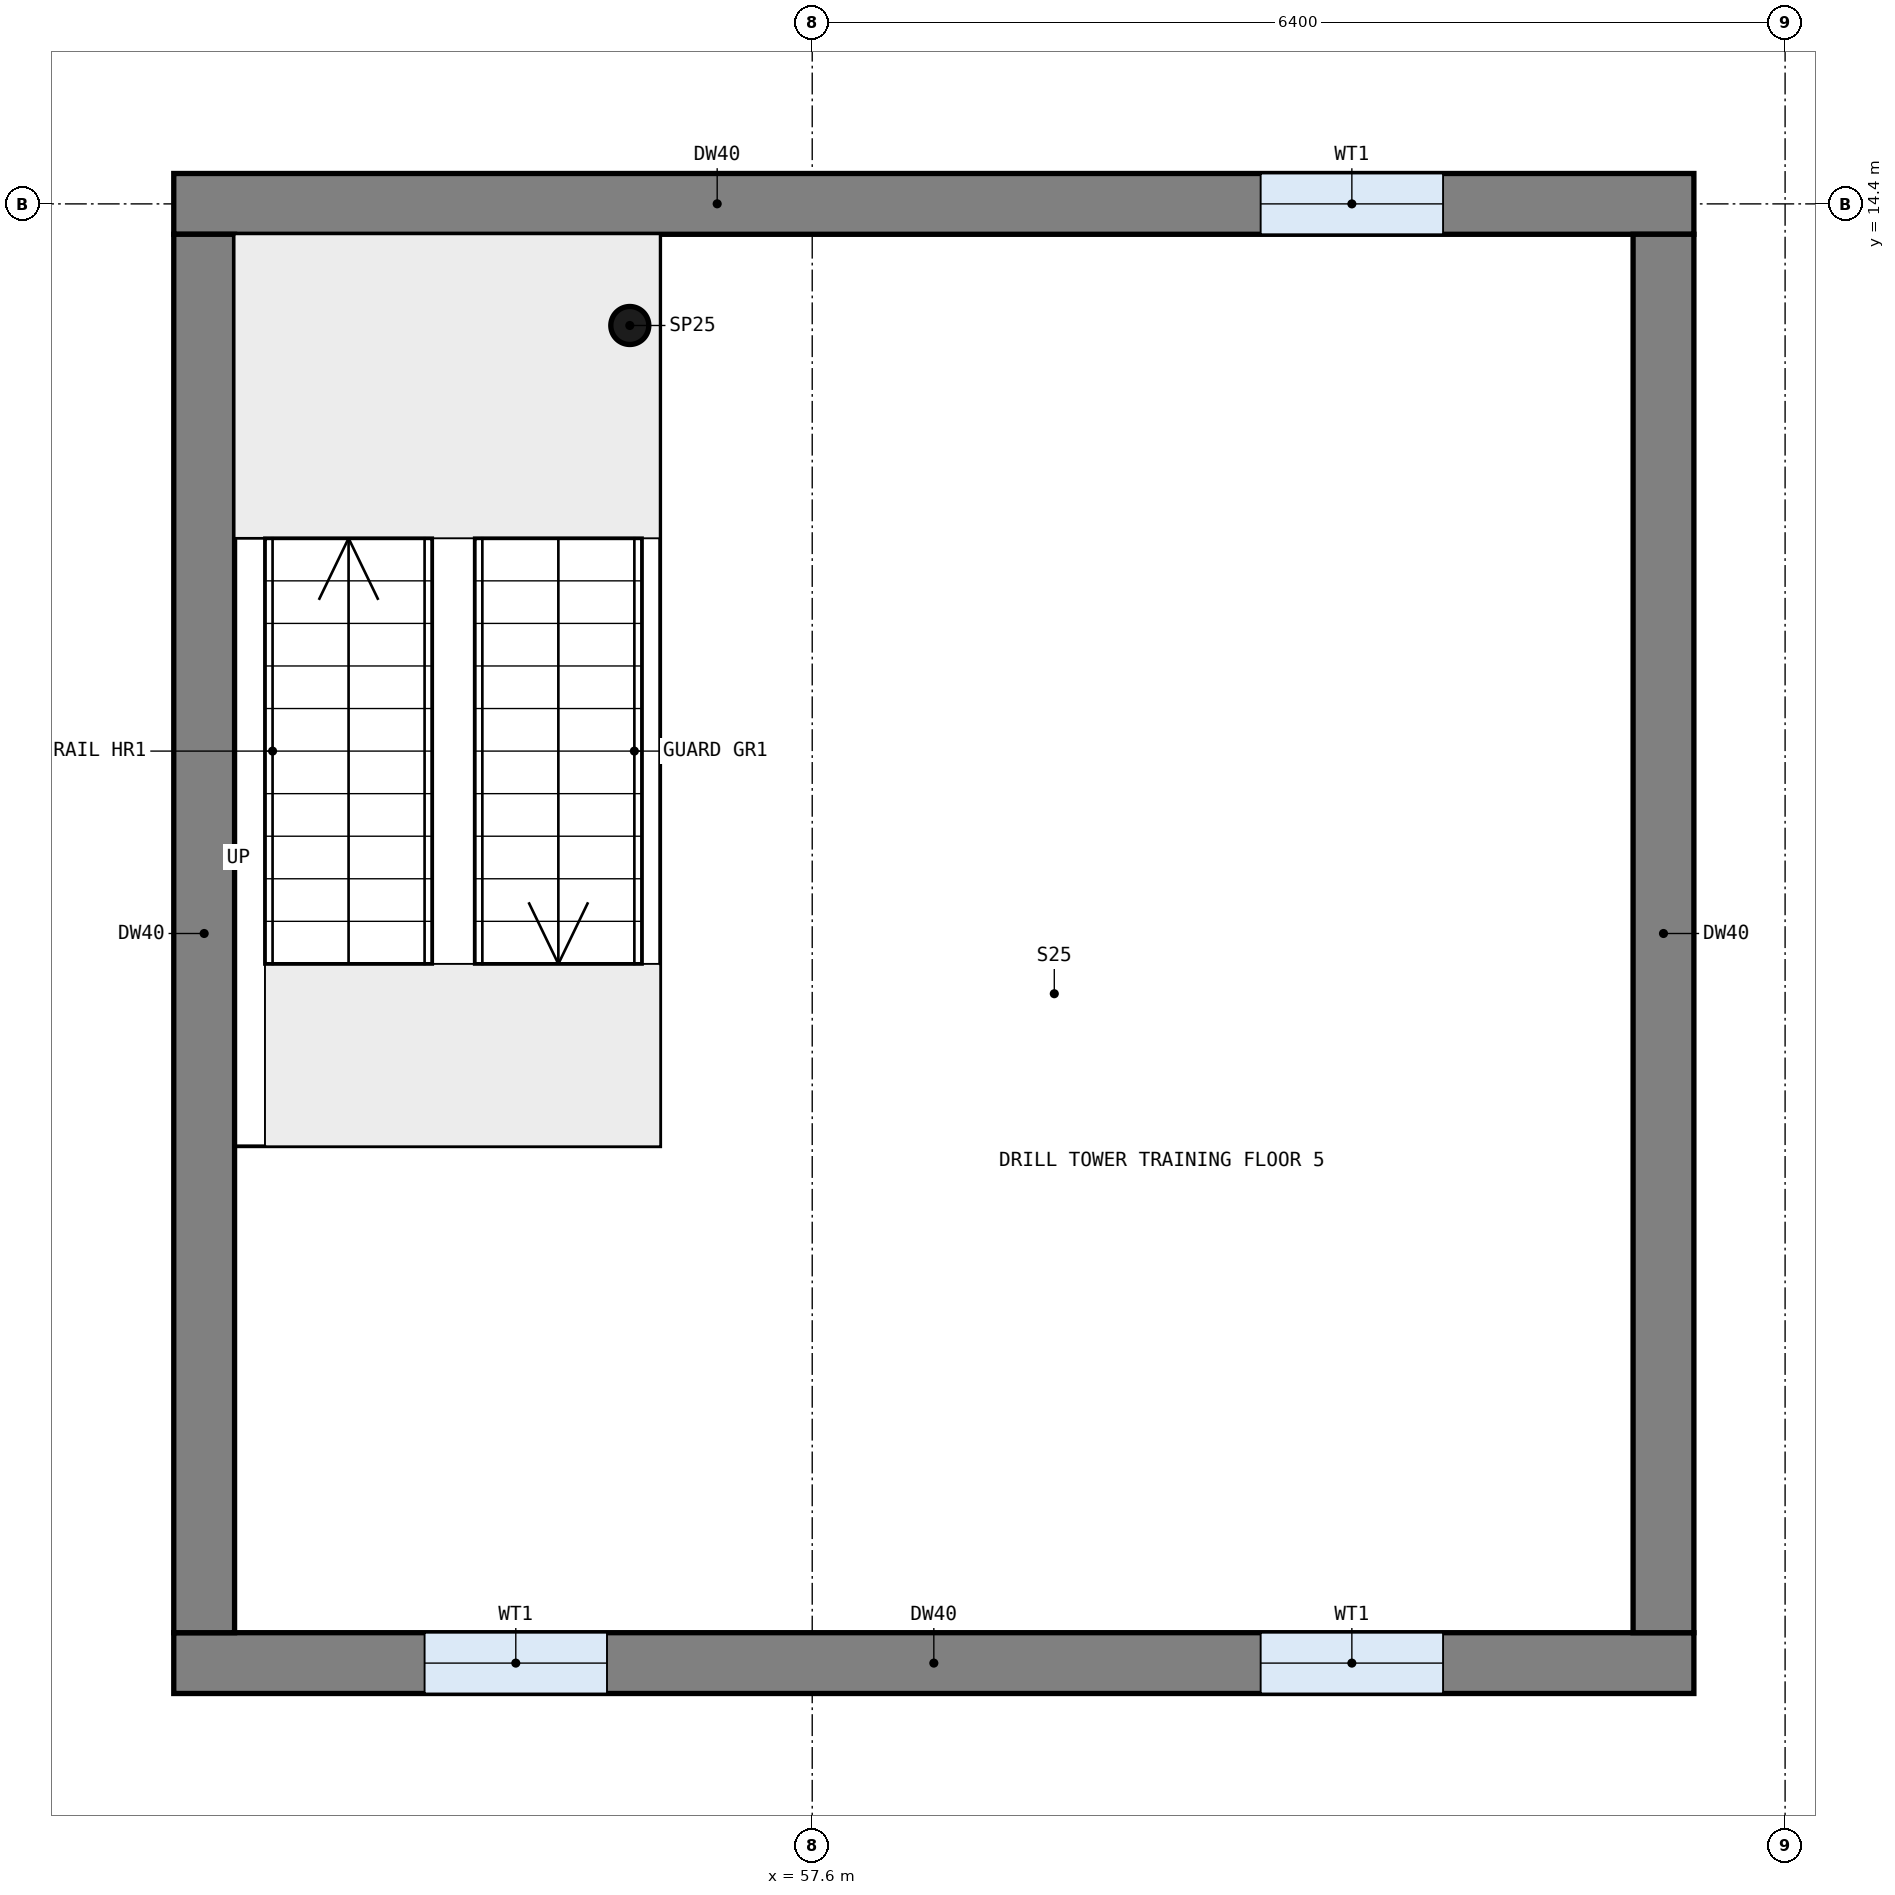
"""IFC4 building model, lengths in metres.
Left out: names, types, materials, properties, quantities, classifications, styles, units other than length and angle.
Written with IfcOpenShell. Run it as: python <this file> out.ifc"""

import sys

from ifc_helpers import new_model, si_unit, direction, frame, frame_2d, origin, origin_2d, place, context, subcontext, project, spatial, rectangle, circle, extrude, element, fill, save


model = new_model("IFC4")
c1 = context("Model", 3, precision=1e-05, world=origin(), true_north=direction((0.0, 1.0)))
c2 = subcontext(c1, "Body", "Model", "MODEL_VIEW")
j1 = project(units=[si_unit("LENGTHUNIT", "METRE"), si_unit("PLANEANGLEUNIT", "RADIAN")], contexts=[c1])
p1 = place(None, origin())
s1 = spatial("IfcSite", under=j1, at=p1, CompositionType="ELEMENT")
p2 = place(p1, origin())
s2 = spatial("IfcBuilding", under=s1, at=p2, CompositionType="ELEMENT")
p3 = place(p2, frame((0.0, 0.0, 17.1)))
s3 = spatial("IfcBuildingStorey", under=s2, at=p3, CompositionType="ELEMENT", Elevation=17.1)
p4 = place(p3, frame((53.4, 14.4, 0.0), z_axis=(0.0, 0.0, 1.0), x_axis=(1.0, 0.0, 0.0)))
e1 = element("IfcWall", 1, at=p4, inside=s3, PredefinedType="SHEAR", context=c2, shape_type="SweptSolid", body=[
    extrude(rectangle(XDim=10.0, YDim=0.4, at=frame_2d((5.0, 0.0))), origin(), (0.0, 0.0, 1.0), 3.9),
])
p5 = place(p4, frame((7.15, 0.0, 1.1)))
e2 = element("IfcOpeningElement", 2, at=p5, cuts=e1, PredefinedType="OPENING", context=c2, shape_type="SweptSolid", body=[
    extrude(rectangle(XDim=1.2, YDim=1.5, at=frame_2d((0.6, 0.75))), frame((0.0, 0.21, 0.0), z_axis=(0.0, -1.0, 0.0), x_axis=(1.0, 0.0, 0.0)), (0.0, 0.0, 1.0), 0.42),
])
p6 = place(p3, frame((53.4, 4.8, 0.0), z_axis=(0.0, 0.0, 1.0), x_axis=(1.0, 0.0, 0.0)))
e3 = element("IfcWall", 3, at=p6, inside=s3, PredefinedType="SHEAR", context=c2, shape_type="SweptSolid", body=[
    extrude(rectangle(XDim=10.0, YDim=0.4, at=frame_2d((5.0, 0.0))), origin(), (0.0, 0.0, 1.0), 3.9),
])
p7 = place(p6, frame((1.65, 0.0, 1.1)))
e4 = element("IfcOpeningElement", 4, at=p7, cuts=e3, PredefinedType="OPENING", context=c2, shape_type="SweptSolid", body=[
    extrude(rectangle(XDim=1.2, YDim=1.5, at=frame_2d((0.6, 0.75))), frame((0.0, 0.21, 0.0), z_axis=(0.0, -1.0, 0.0), x_axis=(1.0, 0.0, 0.0)), (0.0, 0.0, 1.0), 0.42),
])
p8 = place(p6, frame((7.15, 0.0, 1.1)))
e5 = element("IfcOpeningElement", 5, at=p8, cuts=e3, PredefinedType="OPENING", context=c2, shape_type="SweptSolid", body=[
    extrude(rectangle(XDim=1.2, YDim=1.5, at=frame_2d((0.6, 0.75))), frame((0.0, 0.21, 0.0), z_axis=(0.0, -1.0, 0.0), x_axis=(1.0, 0.0, 0.0)), (0.0, 0.0, 1.0), 0.42),
])
for number, where, z_axis, x_axis in (
    (6, (63.2, 5.0, 0.0), (0.0, 0.0, 1.0), (0.0, 1.0, 0.0)),
    (7, (53.6, 5.0, 0.0), (0.0, 0.0, 1.0), (0.0, 1.0, 0.0)),
):
    element("IfcWall", number, at=place(p3, frame(where, z_axis=z_axis, x_axis=x_axis)), inside=s3, PredefinedType="SHEAR", context=c2, shape_type="SweptSolid", body=[
        extrude(rectangle(XDim=9.2, YDim=0.4, at=frame_2d((4.6, 0.0))), origin(), (0.0, 0.0, 1.0), 3.9),
    ])
p9 = place(p3, frame((56.4, 13.6, 0.0), z_axis=(0.0, 0.0, 1.0), x_axis=(1.0, 0.0, 0.0)))
e8 = element("IfcColumn", 8, at=p9, inside=s3, PredefinedType="COLUMN", context=c2, shape_type="SweptSolid", body=[
    extrude(circle(Radius=0.125, at=origin_2d()), origin(), (0.0, 0.0, 1.0), 3.9),
])
p10 = place(p7, origin())
e9 = element("IfcWindow", 9, at=p10, inside=s3, PartitioningType="SINGLE_PANEL", PredefinedType="WINDOW", context=c2, shape_type="SweptSolid", body=[
    extrude(rectangle(XDim=1.2, YDim=1.5, at=frame_2d((0.6, 0.75))), frame((0.0, 0.03, 0.0), z_axis=(0.0, -1.0, 0.0), x_axis=(1.0, 0.0, 0.0)), (0.0, 0.0, 1.0), 0.06),
])
fill(e4, e9)
p11 = place(p8, origin())
e10 = element("IfcWindow", 10, at=p11, inside=s3, PartitioningType="SINGLE_PANEL", PredefinedType="WINDOW", context=c2, shape_type="SweptSolid", body=[
    extrude(rectangle(XDim=1.2, YDim=1.5, at=frame_2d((0.6, 0.75))), frame((0.0, 0.03, 0.0), z_axis=(0.0, -1.0, 0.0), x_axis=(1.0, 0.0, 0.0)), (0.0, 0.0, 1.0), 0.06),
])
fill(e5, e10)
p12 = place(p5, origin())
e11 = element("IfcWindow", 11, at=p12, inside=s3, PartitioningType="SINGLE_PANEL", PredefinedType="WINDOW", context=c2, shape_type="SweptSolid", body=[
    extrude(rectangle(XDim=1.2, YDim=1.5, at=frame_2d((0.6, 0.75))), frame((0.0, 0.03, 0.0), z_axis=(0.0, -1.0, 0.0), x_axis=(1.0, 0.0, 0.0)), (0.0, 0.0, 1.0), 0.06),
])
fill(e2, e11)
save(model, sys.argv[1])
